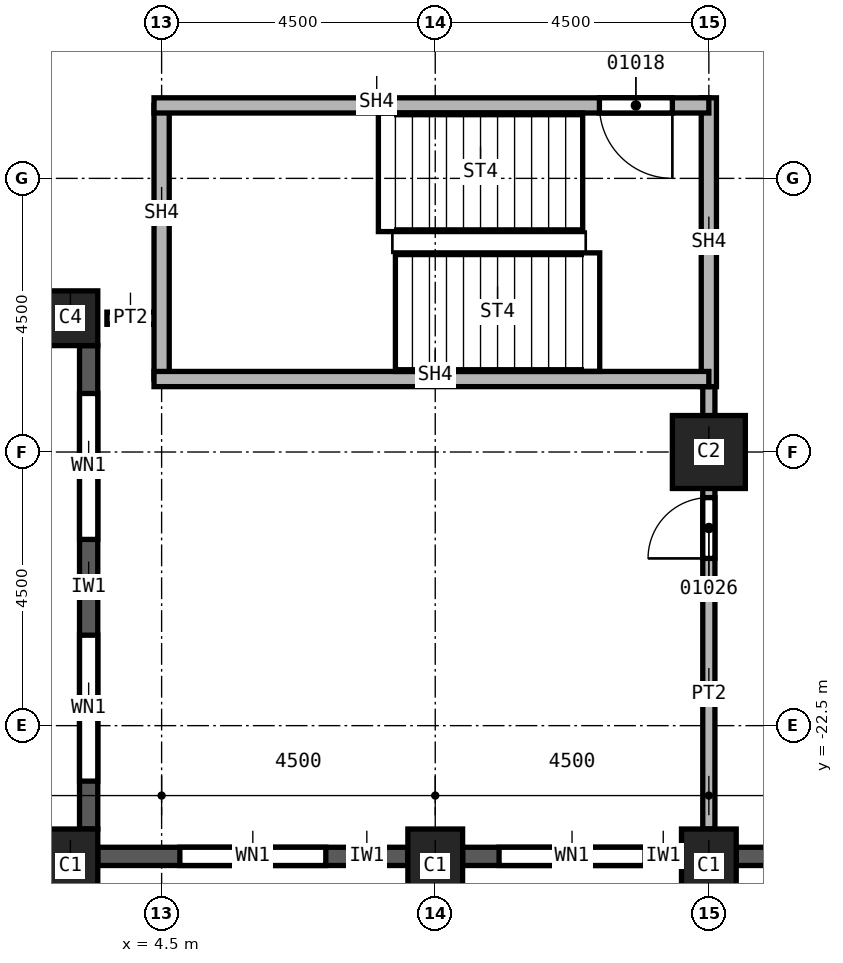
"""IFC4 building model, lengths in metres.
Left out: names, types, materials, properties, quantities, classifications, styles, units other than length and angle.
Written with IfcOpenShell. Run it as: python <this file> out.ifc"""

import sys

from ifc_helpers import new_model, si_unit, direction, frame, frame_2d, origin, origin_2d, place, context, subcontext, project, spatial, rectangle, extrude, element, fill, save


model = new_model("IFC4")
c1 = context("Model", 3, precision=1e-05, world=origin(), true_north=direction((0.0, 1.0)))
c2 = subcontext(c1, "Body", "Model", "MODEL_VIEW")
j1 = project(units=[si_unit("LENGTHUNIT", "METRE"), si_unit("PLANEANGLEUNIT", "RADIAN")], contexts=[c1])
p1 = place(None, origin())
s1 = spatial("IfcSite", under=j1, at=p1, CompositionType="ELEMENT")
p2 = place(p1, origin())
s2 = spatial("IfcBuilding", under=s1, at=p2, CompositionType="ELEMENT")
p3 = place(p2, frame((0.0, 0.0, 72.0)))
s3 = spatial("IfcBuildingStorey", under=s2, at=p3, CompositionType="ELEMENT", Elevation=72.0)
p4 = place(p3, frame((13.5, -18.0, 0.0), z_axis=(0.0, 0.0, 1.0), x_axis=(1.0, 0.0, 0.0)))
e1 = element("IfcColumn", 1, at=p4, inside=s3, PredefinedType="COLUMN", context=c2, shape_type="SweptSolid", body=[
    extrude(rectangle(XDim=1.2, YDim=1.2, at=origin_2d()), origin(), (0.0, 0.0, 1.0), 3.7),
])
for number, where, z_axis, x_axis in (
    (2, (3.0, -24.8, 0.0), (0.0, 0.0, 1.0), (1.0, 0.0, 0.0)),
    (3, (9.0, -24.8, 0.0), (0.0, 0.0, 1.0), (1.0, 0.0, 0.0)),
    (4, (13.5, -24.8, 0.0), (0.0, 0.0, 1.0), (1.0, 0.0, 0.0)),
):
    element("IfcColumn", number, at=place(p3, frame(where, z_axis=z_axis, x_axis=x_axis)), inside=s3, PredefinedType="COLUMN", context=c2, shape_type="SweptSolid", body=[
        extrude(rectangle(XDim=0.9, YDim=1.2, at=origin_2d()), origin(), (0.0, 0.0, 1.0), 3.7),
    ])
p5 = place(p3, frame((3.0, -15.8, 0.0), z_axis=(0.0, 0.0, 1.0), x_axis=(1.0, 0.0, 0.0)))
e5 = element("IfcColumn", 5, at=p5, inside=s3, PredefinedType="COLUMN", context=c2, shape_type="SweptSolid", body=[
    extrude(rectangle(XDim=0.9, YDim=0.9, at=origin_2d()), origin(), (0.0, 0.0, 1.0), 3.7),
])
p6 = place(p3, frame((3.3, -16.25, 0.0), z_axis=(0.0, 0.0, 1.0), x_axis=(0.0, -1.0, 0.0)))
e6 = element("IfcWall", 6, at=p6, inside=s3, PredefinedType="SOLIDWALL", context=c2, shape_type="SweptSolid", body=[
    extrude(rectangle(XDim=7.95, YDim=0.3, at=frame_2d((3.975, 0.0))), origin(), (0.0, 0.0, 1.0), 3.1),
])
p7 = place(p6, frame((0.788, 0.0, 0.8)))
e7 = element("IfcOpeningElement", 7, at=p7, cuts=e6, PredefinedType="OPENING", context=c2, shape_type="SweptSolid", body=[
    extrude(rectangle(XDim=2.4, YDim=1.95, at=frame_2d((1.2, 0.975))), frame((0.0, 0.15, 0.0), z_axis=(0.0, -1.0, 0.0), x_axis=(1.0, 0.0, 0.0)), (0.0, 0.0, 1.0), 0.3),
])
p8 = place(p6, frame((4.762, 0.0, 0.8)))
e8 = element("IfcOpeningElement", 8, at=p8, cuts=e6, PredefinedType="OPENING", context=c2, shape_type="SweptSolid", body=[
    extrude(rectangle(XDim=2.4, YDim=1.95, at=frame_2d((1.2, 0.975))), frame((0.0, 0.15, 0.0), z_axis=(0.0, -1.0, 0.0), x_axis=(1.0, 0.0, 0.0)), (0.0, 0.0, 1.0), 0.3),
])
p9 = place(p3, frame((3.45, -24.65, 0.0), z_axis=(0.0, 0.0, 1.0), x_axis=(1.0, 0.0, 0.0)))
e9 = element("IfcWall", 9, at=p9, inside=s3, PredefinedType="SOLIDWALL", context=c2, shape_type="SweptSolid", body=[
    extrude(rectangle(XDim=5.1, YDim=0.3, at=frame_2d((2.55, 0.0))), origin(), (0.0, 0.0, 1.0), 3.1),
])
p10 = place(p9, frame((1.35, 0.0, 0.8)))
e10 = element("IfcOpeningElement", 10, at=p10, cuts=e9, PredefinedType="OPENING", context=c2, shape_type="SweptSolid", body=[
    extrude(rectangle(XDim=2.4, YDim=1.95, at=frame_2d((1.2, 0.975))), frame((0.0, 0.15, 0.0), z_axis=(0.0, -1.0, 0.0), x_axis=(1.0, 0.0, 0.0)), (0.0, 0.0, 1.0), 0.3),
])
p11 = place(p3, frame((9.45, -24.65, 0.0), z_axis=(0.0, 0.0, 1.0), x_axis=(1.0, 0.0, 0.0)))
e11 = element("IfcWall", 11, at=p11, inside=s3, PredefinedType="SOLIDWALL", context=c2, shape_type="SweptSolid", body=[
    extrude(rectangle(XDim=3.6, YDim=0.3, at=frame_2d((1.8, 0.0))), origin(), (0.0, 0.0, 1.0), 3.1),
])
p12 = place(p11, frame((0.6, 0.0, 0.8)))
e12 = element("IfcOpeningElement", 12, at=p12, cuts=e11, PredefinedType="OPENING", context=c2, shape_type="SweptSolid", body=[
    extrude(rectangle(XDim=2.4, YDim=1.95, at=frame_2d((1.2, 0.975))), frame((0.0, 0.15, 0.0), z_axis=(0.0, -1.0, 0.0), x_axis=(1.0, 0.0, 0.0)), (0.0, 0.0, 1.0), 0.3),
])
p13 = place(p3, frame((13.95, -24.65, 0.0), z_axis=(0.0, 0.0, 1.0), x_axis=(1.0, 0.0, 0.0)))
e13 = element("IfcWall", 13, at=p13, inside=s3, PredefinedType="SOLIDWALL", context=c2, shape_type="SweptSolid", body=[
    extrude(rectangle(XDim=3.6, YDim=0.3, at=frame_2d((1.8, 0.0))), origin(), (0.0, 0.0, 1.0), 3.1),
])
p14 = place(p13, frame((0.625, 0.0, 0.8)))
e14 = element("IfcOpeningElement", 14, at=p14, cuts=e13, PredefinedType="OPENING", context=c2, shape_type="SweptSolid", body=[
    extrude(rectangle(XDim=0.6, YDim=1.95, at=frame_2d((0.3, 0.975))), frame((0.0, 0.15, 0.0), z_axis=(0.0, -1.0, 0.0), x_axis=(1.0, 0.0, 0.0)), (0.0, 0.0, 1.0), 0.3),
])
p15 = place(p13, frame((1.825, 0.0, 0.8)))
e15 = element("IfcOpeningElement", 15, at=p15, cuts=e13, PredefinedType="OPENING", context=c2, shape_type="SweptSolid", body=[
    extrude(rectangle(XDim=1.0, YDim=1.95, at=frame_2d((0.5, 0.975))), frame((0.0, 0.15, 0.0), z_axis=(0.0, -1.0, 0.0), x_axis=(1.0, 0.0, 0.0)), (0.0, 0.0, 1.0), 0.3),
])
p16 = place(p3, frame((4.5, -15.8, 0.0), z_axis=(0.0, 0.0, 1.0), x_axis=(-1.0, 0.0, 0.0)))
e16 = element("IfcWall", 16, at=p16, inside=s3, PredefinedType="PARTITIONING", context=c2, shape_type="SweptSolid", body=[
    extrude(rectangle(XDim=0.9, YDim=0.2, at=frame_2d((0.45, 0.0))), origin(), (0.0, 0.0, 1.0), 3.7),
])
p17 = place(p3, frame((13.5, -24.2, 0.0), z_axis=(0.0, 0.0, 1.0), x_axis=(0.0, 1.0, 0.0)))
e17 = element("IfcWall", 17, at=p17, inside=s3, PredefinedType="PARTITIONING", context=c2, shape_type="SweptSolid", body=[
    extrude(rectangle(XDim=7.525, YDim=0.2, at=frame_2d((3.762, 0.0))), origin(), (0.0, 0.0, 1.0), 3.7),
])
p18 = place(p17, frame((4.45, 0.0, 0.0)))
e18 = element("IfcOpeningElement", 18, at=p18, cuts=e17, PredefinedType="OPENING", context=c2, shape_type="SweptSolid", body=[
    extrude(rectangle(XDim=1.0, YDim=2.1, at=frame_2d((0.5, 1.05))), frame((0.0, 0.1, 0.0), z_axis=(0.0, -1.0, 0.0), x_axis=(1.0, 0.0, 0.0)), (0.0, 0.0, 1.0), 0.2),
])
p19 = place(p3, frame((4.5, -16.8, 0.0), z_axis=(0.0, 0.0, 1.0), x_axis=(0.0, 1.0, 0.0)))
e19 = element("IfcWall", 19, at=p19, inside=s3, PredefinedType="SOLIDWALL", context=c2, shape_type="SweptSolid", body=[
    extrude(rectangle(XDim=4.5, YDim=0.25, at=frame_2d((2.25, 0.0))), origin(), (0.0, 0.0, 1.0), 3.7),
])
p20 = place(p3, frame((13.5, -16.925, 0.0), z_axis=(0.0, 0.0, 1.0), x_axis=(0.0, 1.0, 0.0)))
e20 = element("IfcWall", 20, at=p20, inside=s3, PredefinedType="SOLIDWALL", context=c2, shape_type="SweptSolid", body=[
    extrude(rectangle(XDim=4.75, YDim=0.25, at=frame_2d((2.375, 0.0))), origin(), (0.0, 0.0, 1.0), 3.7),
])
p21 = place(p3, frame((13.5, -16.8, 0.0), z_axis=(0.0, 0.0, 1.0), x_axis=(-1.0, 0.0, 0.0)))
e21 = element("IfcWall", 21, at=p21, inside=s3, PredefinedType="SOLIDWALL", context=c2, shape_type="SweptSolid", body=[
    extrude(rectangle(XDim=9.125, YDim=0.25, at=frame_2d((4.562, 0.0))), origin(), (0.0, 0.0, 1.0), 3.7),
])
p22 = place(p3, frame((13.5, -12.3, 0.0), z_axis=(0.0, 0.0, 1.0), x_axis=(-1.0, 0.0, 0.0)))
e22 = element("IfcWall", 22, at=p22, inside=s3, PredefinedType="SOLIDWALL", context=c2, shape_type="SweptSolid", body=[
    extrude(rectangle(XDim=9.125, YDim=0.25, at=frame_2d((4.562, 0.0))), origin(), (0.0, 0.0, 1.0), 3.7),
])
p23 = place(p22, frame((0.6, 0.0, 0.0)))
e23 = element("IfcOpeningElement", 23, at=p23, cuts=e22, PredefinedType="OPENING", context=c2, shape_type="SweptSolid", body=[
    extrude(rectangle(XDim=1.2, YDim=2.1, at=frame_2d((0.6, 1.05))), frame((0.0, 0.125, 0.0), z_axis=(0.0, -1.0, 0.0), x_axis=(1.0, 0.0, 0.0)), (0.0, 0.0, 1.0), 0.25),
])
p24 = place(p7, origin())
e24 = element("IfcWindow", 24, at=p24, inside=s3, PartitioningType="SINGLE_PANEL", PredefinedType="WINDOW", context=c2, shape_type="SweptSolid", body=[
    extrude(rectangle(XDim=2.4, YDim=1.95, at=frame_2d((1.2, 0.975))), frame((0.0, 0.03, 0.0), z_axis=(0.0, -1.0, 0.0), x_axis=(1.0, 0.0, 0.0)), (0.0, 0.0, 1.0), 0.06),
])
fill(e7, e24)
p25 = place(p8, origin())
e25 = element("IfcWindow", 25, at=p25, inside=s3, PartitioningType="SINGLE_PANEL", PredefinedType="WINDOW", context=c2, shape_type="SweptSolid", body=[
    extrude(rectangle(XDim=2.4, YDim=1.95, at=frame_2d((1.2, 0.975))), frame((0.0, 0.03, 0.0), z_axis=(0.0, -1.0, 0.0), x_axis=(1.0, 0.0, 0.0)), (0.0, 0.0, 1.0), 0.06),
])
fill(e8, e25)
p26 = place(p10, origin())
e26 = element("IfcWindow", 26, at=p26, inside=s3, PartitioningType="SINGLE_PANEL", PredefinedType="WINDOW", context=c2, shape_type="SweptSolid", body=[
    extrude(rectangle(XDim=2.4, YDim=1.95, at=frame_2d((1.2, 0.975))), frame((0.0, 0.03, 0.0), z_axis=(0.0, -1.0, 0.0), x_axis=(1.0, 0.0, 0.0)), (0.0, 0.0, 1.0), 0.06),
])
fill(e10, e26)
p27 = place(p12, origin())
e27 = element("IfcWindow", 27, at=p27, inside=s3, PartitioningType="SINGLE_PANEL", PredefinedType="WINDOW", context=c2, shape_type="SweptSolid", body=[
    extrude(rectangle(XDim=2.4, YDim=1.95, at=frame_2d((1.2, 0.975))), frame((0.0, 0.03, 0.0), z_axis=(0.0, -1.0, 0.0), x_axis=(1.0, 0.0, 0.0)), (0.0, 0.0, 1.0), 0.06),
])
fill(e12, e27)
p28 = place(p23, origin())
e28 = element("IfcDoor", 28, at=p28, inside=s3, OperationType="SINGLE_SWING_LEFT", PredefinedType="DOOR", context=c2, shape_type="SweptSolid", body=[
    extrude(rectangle(XDim=1.2, YDim=2.1, at=frame_2d((0.6, 1.05))), frame((0.0, 0.025, 0.0), z_axis=(0.0, -1.0, 0.0), x_axis=(1.0, 0.0, 0.0)), (0.0, 0.0, 1.0), 0.05),
])
fill(e23, e28)
p29 = place(p18, origin())
e29 = element("IfcDoor", 29, at=p29, inside=s3, OperationType="SINGLE_SWING_LEFT", PredefinedType="DOOR", context=c2, shape_type="SweptSolid", body=[
    extrude(rectangle(XDim=1.0, YDim=2.1, at=frame_2d((0.5, 1.05))), frame((0.0, 0.025, 0.0), z_axis=(0.0, -1.0, 0.0), x_axis=(1.0, 0.0, 0.0)), (0.0, 0.0, 1.0), 0.05),
])
fill(e18, e29)
save(model, sys.argv[1])
